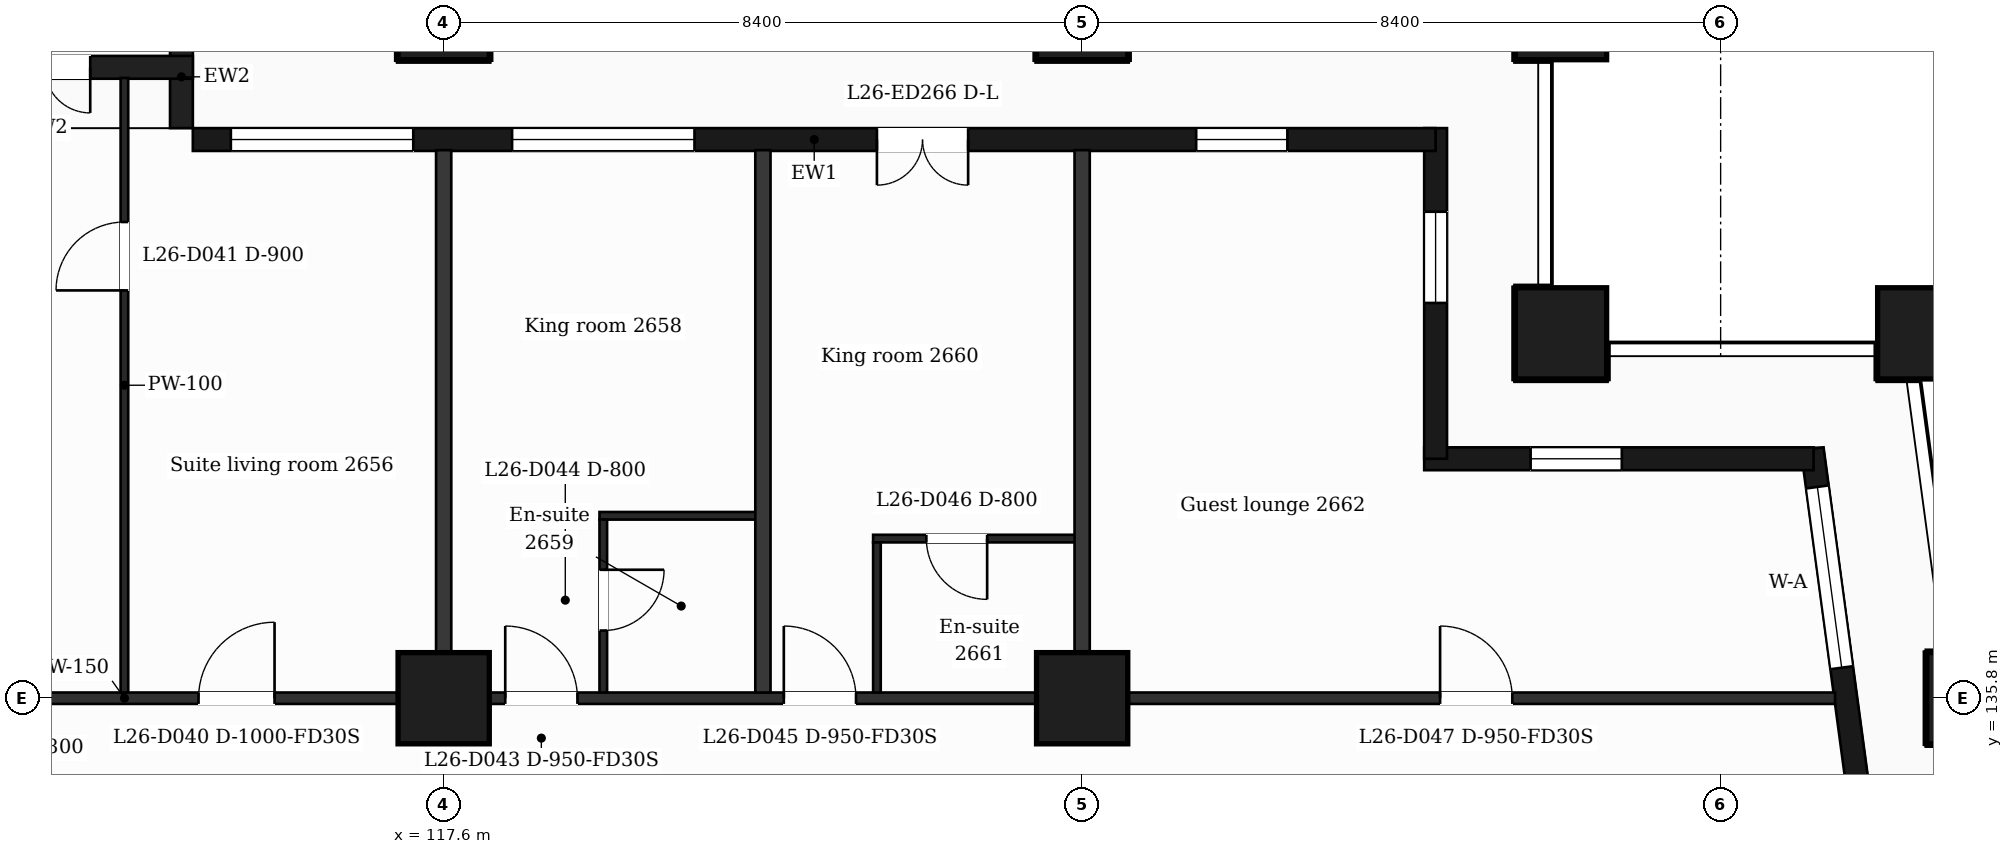
"""IFC4 building model, lengths in metres.
Left out: names, types, materials, properties, quantities, classifications, styles, units other than length and angle.
Written with IfcOpenShell. Run it as: python <this file> out.ifc"""

import sys

from ifc_helpers import new_model, si_unit, direction, frame, frame_2d, origin, origin_2d, place, context, subcontext, project, spatial, rectangle, extrude, element, fill, save


model = new_model("IFC4")
c1 = context("Model", 3, precision=1e-05, world=origin(), true_north=direction((0.0, 1.0)))
c2 = subcontext(c1, "Body", "Model", "MODEL_VIEW")
j1 = project(units=[si_unit("LENGTHUNIT", "METRE"), si_unit("PLANEANGLEUNIT", "RADIAN")], contexts=[c1])
p1 = place(None, origin())
s1 = spatial("IfcSite", under=j1, at=p1, CompositionType="ELEMENT")
p2 = place(p1, origin())
s2 = spatial("IfcBuilding", under=s1, at=p2, CompositionType="ELEMENT")
p3 = place(p2, frame((0.0, 0.0, 113.2)))
s3 = spatial("IfcBuildingStorey", under=s2, at=p3, CompositionType="ELEMENT", Elevation=113.2)
for number, where, z_axis, x_axis in (
    (1, (132.3, 140.6, 0.0), (0.0, 0.0, 1.0), (1.0, 0.0, 0.0)),
    (2, (137.065, 140.6, 0.0), (0.0, 0.0, 1.0), (1.0, 0.0, 0.0)),
    (3, (117.6, 135.8, 0.0), (0.0, 0.0, 1.0), (1.0, 0.0, 0.0)),
    (4, (126.0, 135.8, 0.0), (0.0, 0.0, 1.0), (1.0, 0.0, 0.0)),
    (5, (137.711, 135.8, 0.0), (0.0, 0.0, 1.0), (1.0, 0.0, 0.0)),
    (6, (117.6, 144.8, 0.0), (0.0, 0.0, 1.0), (1.0, 0.0, 0.0)),
    (7, (126.0, 144.8, 0.0), (0.0, 0.0, 1.0), (1.0, 0.0, 0.0)),
    (8, (132.3, 144.8, 0.0), (0.0, 0.0, 1.0), (1.0, 0.0, 0.0)),
):
    element("IfcColumn", number, at=place(p3, frame(where, z_axis=z_axis, x_axis=x_axis)), inside=s3, PredefinedType="COLUMN", context=c2, shape_type="SweptSolid", body=[
        extrude(rectangle(XDim=1.2, YDim=1.2, at=origin_2d()), origin(), (0.0, 0.0, 1.0), 3.7),
    ])
p4 = place(p3, frame((136.504, 132.4, 0.0), z_axis=(0.0, 0.0, 1.0), x_axis=(-0.133399697462, 0.99106231929, 0.0)))
e9 = element("IfcWall", 9, at=p4, inside=s3, PredefinedType="SOLIDWALL", context=c2, shape_type="SweptSolid", body=[
    extrude(rectangle(XDim=6.74, YDim=0.3, at=frame_2d((3.37, 0.0))), origin(), (0.0, 0.0, 1.0), 3.38),
])
p5 = place(p4, frame((1.115, 0.0, 0.0)))
e10 = element("IfcOpeningElement", 10, at=p5, cuts=e9, PredefinedType="OPENING", context=c2, shape_type="SweptSolid", body=[
    extrude(rectangle(XDim=1.2, YDim=2.4, at=frame_2d((0.6, 1.2))), frame((0.0, 0.16, 0.0), z_axis=(0.0, -1.0, 0.0), x_axis=(1.0, 0.0, 0.0)), (0.0, 0.0, 1.0), 0.32),
])
p6 = place(p4, frame((3.835, 0.0, 0.9)))
e11 = element("IfcOpeningElement", 11, at=p6, cuts=e9, PredefinedType="OPENING", context=c2, shape_type="SweptSolid", body=[
    extrude(rectangle(XDim=2.4, YDim=2.1, at=frame_2d((1.2, 1.05))), frame((0.0, 0.16, 0.0), z_axis=(0.0, -1.0, 0.0), x_axis=(1.0, 0.0, 0.0)), (0.0, 0.0, 1.0), 0.32),
])
p7 = place(p3, frame((135.623, 138.95, 0.0), z_axis=(0.0, 0.0, 1.0), x_axis=(-1.0, 0.0, 0.0)))
e12 = element("IfcWall", 12, at=p7, inside=s3, PredefinedType="SOLIDWALL", context=c2, shape_type="SweptSolid", body=[
    extrude(rectangle(XDim=5.123, YDim=0.3, at=frame_2d((2.561, 0.0))), origin(), (0.0, 0.0, 1.0), 3.38),
])
p8 = place(p7, frame((2.523, 0.0, 0.9)))
e13 = element("IfcOpeningElement", 13, at=p8, cuts=e12, PredefinedType="OPENING", context=c2, shape_type="SweptSolid", body=[
    extrude(rectangle(XDim=1.2, YDim=2.1, at=frame_2d((0.6, 1.05))), frame((0.0, 0.16, 0.0), z_axis=(0.0, -1.0, 0.0), x_axis=(1.0, 0.0, 0.0)), (0.0, 0.0, 1.0), 0.32),
])
p9 = place(p3, frame((130.65, 138.95, 0.0), z_axis=(0.0, 0.0, 1.0), x_axis=(0.0, 1.0, 0.0)))
e14 = element("IfcWall", 14, at=p9, inside=s3, PredefinedType="SOLIDWALL", context=c2, shape_type="SweptSolid", body=[
    extrude(rectangle(XDim=4.35, YDim=0.3, at=frame_2d((2.175, 0.0))), origin(), (0.0, 0.0, 1.0), 3.38),
])
p10 = place(p9, frame((2.05, 0.0, 0.9)))
e15 = element("IfcOpeningElement", 15, at=p10, cuts=e14, PredefinedType="OPENING", context=c2, shape_type="SweptSolid", body=[
    extrude(rectangle(XDim=1.2, YDim=2.1, at=frame_2d((0.6, 1.05))), frame((0.0, 0.16, 0.0), z_axis=(0.0, -1.0, 0.0), x_axis=(1.0, 0.0, 0.0)), (0.0, 0.0, 1.0), 0.32),
])
p11 = place(p3, frame((130.65, 143.15, 0.0), z_axis=(0.0, 0.0, 1.0), x_axis=(-1.0, 0.0, 0.0)))
e16 = element("IfcWall", 16, at=p11, inside=s3, PredefinedType="SOLIDWALL", context=c2, shape_type="SweptSolid", body=[
    extrude(rectangle(XDim=16.35, YDim=0.3, at=frame_2d((8.175, 0.0))), origin(), (0.0, 0.0, 1.0), 3.38),
])
p12 = place(p11, frame((1.95, 0.0, 0.9)))
e17 = element("IfcOpeningElement", 17, at=p12, cuts=e16, PredefinedType="OPENING", context=c2, shape_type="SweptSolid", body=[
    extrude(rectangle(XDim=1.2, YDim=2.1, at=frame_2d((0.6, 1.05))), frame((0.0, 0.16, 0.0), z_axis=(0.0, -1.0, 0.0), x_axis=(1.0, 0.0, 0.0)), (0.0, 0.0, 1.0), 0.32),
])
p13 = place(p11, frame((6.15, 0.0, 0.0)))
e18 = element("IfcOpeningElement", 18, at=p13, cuts=e16, PredefinedType="OPENING", context=c2, shape_type="SweptSolid", body=[
    extrude(rectangle(XDim=1.2, YDim=2.4, at=frame_2d((0.6, 1.2))), frame((0.0, 0.16, 0.0), z_axis=(0.0, -1.0, 0.0), x_axis=(1.0, 0.0, 0.0)), (0.0, 0.0, 1.0), 0.32),
])
p14 = place(p11, frame((9.75, 0.0, 0.9)))
e19 = element("IfcOpeningElement", 19, at=p14, cuts=e16, PredefinedType="OPENING", context=c2, shape_type="SweptSolid", body=[
    extrude(rectangle(XDim=2.4, YDim=2.1, at=frame_2d((1.2, 1.05))), frame((0.0, 0.16, 0.0), z_axis=(0.0, -1.0, 0.0), x_axis=(1.0, 0.0, 0.0)), (0.0, 0.0, 1.0), 0.32),
])
p15 = place(p11, frame((13.45, 0.0, 0.9)))
e20 = element("IfcOpeningElement", 20, at=p15, cuts=e16, PredefinedType="OPENING", context=c2, shape_type="SweptSolid", body=[
    extrude(rectangle(XDim=2.4, YDim=2.1, at=frame_2d((1.2, 1.05))), frame((0.0, 0.16, 0.0), z_axis=(0.0, -1.0, 0.0), x_axis=(1.0, 0.0, 0.0)), (0.0, 0.0, 1.0), 0.32),
])
p16 = place(p3, frame((114.15, 143.3, 0.0), z_axis=(0.0, 0.0, 1.0), x_axis=(0.0, 1.0, 0.0)))
e21 = element("IfcWall", 21, at=p16, inside=s3, PredefinedType="SOLIDWALL", context=c2, shape_type="SweptSolid", body=[
    extrude(rectangle(XDim=1.35, YDim=0.3, at=frame_2d((0.675, 0.0))), origin(), (0.0, 0.0, 1.0), 3.38),
])
p17 = place(p3, frame((114.3, 144.1, 0.0), z_axis=(0.0, 0.0, 1.0), x_axis=(-1.0, 0.0, 0.0)))
e22 = element("IfcWall", 22, at=p17, inside=s3, PredefinedType="SOLIDWALL", context=c2, shape_type="SweptSolid", body=[
    extrude(rectangle(XDim=3.9, YDim=0.3, at=frame_2d((1.95, 0.0))), origin(), (0.0, 0.0, 1.0), 3.38),
])
p18 = place(p17, frame((1.35, 0.0, 0.0)))
e23 = element("IfcOpeningElement", 23, at=p18, cuts=e22, PredefinedType="OPENING", context=c2, shape_type="SweptSolid", body=[
    extrude(rectangle(XDim=1.2, YDim=2.4, at=frame_2d((0.6, 1.2))), frame((0.0, 0.16, 0.0), z_axis=(0.0, -1.0, 0.0), x_axis=(1.0, 0.0, 0.0)), (0.0, 0.0, 1.0), 0.32),
])
p19 = place(p3, frame((90.895, 135.8, 0.0), z_axis=(0.0, 0.0, 1.0), x_axis=(1.0, 0.0, 0.0)))
e24 = element("IfcWall", 24, at=p19, inside=s3, PredefinedType="PARTITIONING", context=c2, shape_type="SweptSolid", body=[
    extrude(rectangle(XDim=45.011, YDim=0.15, at=frame_2d((22.505, 0.0))), origin(), (0.0, 0.0, 1.0), 3.38),
])
p20 = place(p19, frame((6.906, 0.0, 0.0)))
e25 = element("IfcOpeningElement", 25, at=p20, cuts=e24, PredefinedType="OPENING", context=c2, shape_type="SweptSolid", body=[
    extrude(rectangle(XDim=1.0, YDim=2.1, at=frame_2d((0.5, 1.05))), frame((0.0, 0.085, 0.0), z_axis=(0.0, -1.0, 0.0), x_axis=(1.0, 0.0, 0.0)), (0.0, 0.0, 1.0), 0.17),
])
p21 = place(p19, frame((12.13, 0.0, 0.0)))
e26 = element("IfcOpeningElement", 26, at=p21, cuts=e24, PredefinedType="OPENING", context=c2, shape_type="SweptSolid", body=[
    extrude(rectangle(XDim=1.0, YDim=2.1, at=frame_2d((0.5, 1.05))), frame((0.0, 0.085, 0.0), z_axis=(0.0, -1.0, 0.0), x_axis=(1.0, 0.0, 0.0)), (0.0, 0.0, 1.0), 0.17),
])
p22 = place(p19, frame((23.48, 0.0, 0.0)))
e27 = element("IfcOpeningElement", 27, at=p22, cuts=e24, PredefinedType="OPENING", context=c2, shape_type="SweptSolid", body=[
    extrude(rectangle(XDim=1.0, YDim=2.1, at=frame_2d((0.5, 1.05))), frame((0.0, 0.085, 0.0), z_axis=(0.0, -1.0, 0.0), x_axis=(1.0, 0.0, 0.0)), (0.0, 0.0, 1.0), 0.17),
])
p23 = place(p19, frame((27.515, 0.0, 0.0)))
e28 = element("IfcOpeningElement", 28, at=p23, cuts=e24, PredefinedType="OPENING", context=c2, shape_type="SweptSolid", body=[
    extrude(rectangle(XDim=0.95, YDim=2.1, at=frame_2d((0.475, 1.05))), frame((0.0, 0.085, 0.0), z_axis=(0.0, -1.0, 0.0), x_axis=(1.0, 0.0, 0.0)), (0.0, 0.0, 1.0), 0.17),
])
p24 = place(p19, frame((31.18, 0.0, 0.0)))
e29 = element("IfcOpeningElement", 29, at=p24, cuts=e24, PredefinedType="OPENING", context=c2, shape_type="SweptSolid", body=[
    extrude(rectangle(XDim=0.95, YDim=2.1, at=frame_2d((0.475, 1.05))), frame((0.0, 0.085, 0.0), z_axis=(0.0, -1.0, 0.0), x_axis=(1.0, 0.0, 0.0)), (0.0, 0.0, 1.0), 0.17),
])
p25 = place(p19, frame((39.814, 0.0, 0.0)))
e30 = element("IfcOpeningElement", 30, at=p25, cuts=e24, PredefinedType="OPENING", context=c2, shape_type="SweptSolid", body=[
    extrude(rectangle(XDim=0.95, YDim=2.1, at=frame_2d((0.475, 1.05))), frame((0.0, 0.085, 0.0), z_axis=(0.0, -1.0, 0.0), x_axis=(1.0, 0.0, 0.0)), (0.0, 0.0, 1.0), 0.17),
])
p26 = place(p3, frame((123.25, 137.9, 0.0), z_axis=(0.0, 0.0, 1.0), x_axis=(1.0, 0.0, 0.0)))
e31 = element("IfcWall", 31, at=p26, inside=s3, PredefinedType="PARTITIONING", context=c2, shape_type="SweptSolid", body=[
    extrude(rectangle(XDim=2.75, YDim=0.1, at=frame_2d((1.375, 0.0))), origin(), (0.0, 0.0, 1.0), 3.38),
])
p27 = place(p26, frame((0.7, 0.0, 0.0)))
e32 = element("IfcOpeningElement", 32, at=p27, cuts=e31, PredefinedType="OPENING", context=c2, shape_type="SweptSolid", body=[
    extrude(rectangle(XDim=0.8, YDim=2.1, at=frame_2d((0.4, 1.05))), frame((0.0, 0.06, 0.0), z_axis=(0.0, -1.0, 0.0), x_axis=(1.0, 0.0, 0.0)), (0.0, 0.0, 1.0), 0.12),
])
p28 = place(p3, frame((119.65, 138.2, 0.0), z_axis=(0.0, 0.0, 1.0), x_axis=(1.0, 0.0, 0.0)))
e33 = element("IfcWall", 33, at=p28, inside=s3, PredefinedType="PARTITIONING", context=c2, shape_type="SweptSolid", body=[
    extrude(rectangle(XDim=2.15, YDim=0.1, at=frame_2d((1.075, 0.0))), origin(), (0.0, 0.0, 1.0), 3.38),
])
p29 = place(p3, frame((113.4, 135.875, 0.0), z_axis=(0.0, 0.0, 1.0), x_axis=(0.0, 1.0, 0.0)))
e34 = element("IfcWall", 34, at=p29, inside=s3, PredefinedType="PARTITIONING", context=c2, shape_type="SweptSolid", body=[
    extrude(rectangle(XDim=8.085, YDim=0.1, at=frame_2d((4.042, 0.0))), origin(), (0.0, 0.0, 1.0), 3.38),
])
p30 = place(p29, frame((5.29, 0.0, 0.0)))
e35 = element("IfcOpeningElement", 35, at=p30, cuts=e34, PredefinedType="OPENING", context=c2, shape_type="SweptSolid", body=[
    extrude(rectangle(XDim=0.9, YDim=2.1, at=frame_2d((0.45, 1.05))), frame((0.0, 0.06, 0.0), z_axis=(0.0, -1.0, 0.0), x_axis=(1.0, 0.0, 0.0)), (0.0, 0.0, 1.0), 0.12),
])
p31 = place(p3, frame((117.6, 135.875, 0.0), z_axis=(0.0, 0.0, 1.0), x_axis=(0.0, 1.0, 0.0)))
e36 = element("IfcWall", 36, at=p31, inside=s3, PredefinedType="PARTITIONING", context=c2, shape_type="SweptSolid", body=[
    extrude(rectangle(XDim=7.135, YDim=0.2, at=frame_2d((3.567, 0.0))), origin(), (0.0, 0.0, 1.0), 3.38),
])
p32 = place(p3, frame((119.7, 135.875, 0.0), z_axis=(0.0, 0.0, 1.0), x_axis=(0.0, 1.0, 0.0)))
e37 = element("IfcWall", 37, at=p32, inside=s3, PredefinedType="PARTITIONING", context=c2, shape_type="SweptSolid", body=[
    extrude(rectangle(XDim=2.275, YDim=0.1, at=frame_2d((1.137, 0.0))), origin(), (0.0, 0.0, 1.0), 3.38),
])
p33 = place(p32, frame((0.815, 0.0, 0.0)))
e38 = element("IfcOpeningElement", 38, at=p33, cuts=e37, PredefinedType="OPENING", context=c2, shape_type="SweptSolid", body=[
    extrude(rectangle(XDim=0.8, YDim=2.1, at=frame_2d((0.4, 1.05))), frame((0.0, 0.06, 0.0), z_axis=(0.0, -1.0, 0.0), x_axis=(1.0, 0.0, 0.0)), (0.0, 0.0, 1.0), 0.12),
])
p34 = place(p3, frame((121.8, 135.875, 0.0), z_axis=(0.0, 0.0, 1.0), x_axis=(0.0, 1.0, 0.0)))
e39 = element("IfcWall", 39, at=p34, inside=s3, PredefinedType="PARTITIONING", context=c2, shape_type="SweptSolid", body=[
    extrude(rectangle(XDim=7.135, YDim=0.2, at=frame_2d((3.567, 0.0))), origin(), (0.0, 0.0, 1.0), 3.38),
])
p35 = place(p3, frame((123.3, 135.875, 0.0), z_axis=(0.0, 0.0, 1.0), x_axis=(0.0, 1.0, 0.0)))
e40 = element("IfcWall", 40, at=p35, inside=s3, PredefinedType="PARTITIONING", context=c2, shape_type="SweptSolid", body=[
    extrude(rectangle(XDim=1.975, YDim=0.1, at=frame_2d((0.988, 0.0))), origin(), (0.0, 0.0, 1.0), 3.38),
])
p36 = place(p3, frame((126.0, 135.875, 0.0), z_axis=(0.0, 0.0, 1.0), x_axis=(0.0, 1.0, 0.0)))
e41 = element("IfcWall", 41, at=p36, inside=s3, PredefinedType="PARTITIONING", context=c2, shape_type="SweptSolid", body=[
    extrude(rectangle(XDim=7.135, YDim=0.2, at=frame_2d((3.567, 0.0))), origin(), (0.0, 0.0, 1.0), 3.38),
])
p37 = place(p6, origin())
e42 = element("IfcWindow", 42, at=p37, inside=s3, PartitioningType="SINGLE_PANEL", PredefinedType="WINDOW", context=c2, shape_type="SweptSolid", body=[
    extrude(rectangle(XDim=2.4, YDim=2.1, at=frame_2d((1.2, 1.05))), frame((0.0, 0.03, 0.0), z_axis=(0.0, -1.0, 0.0), x_axis=(1.0, 0.0, 0.0)), (0.0, 0.0, 1.0), 0.06),
])
fill(e11, e42)
p38 = place(p8, origin())
e43 = element("IfcWindow", 43, at=p38, inside=s3, PartitioningType="SINGLE_PANEL", PredefinedType="WINDOW", context=c2, shape_type="SweptSolid", body=[
    extrude(rectangle(XDim=1.2, YDim=2.1, at=frame_2d((0.6, 1.05))), frame((0.0, 0.03, 0.0), z_axis=(0.0, -1.0, 0.0), x_axis=(1.0, 0.0, 0.0)), (0.0, 0.0, 1.0), 0.06),
])
fill(e13, e43)
p39 = place(p10, origin())
e44 = element("IfcWindow", 44, at=p39, inside=s3, PartitioningType="SINGLE_PANEL", PredefinedType="WINDOW", context=c2, shape_type="SweptSolid", body=[
    extrude(rectangle(XDim=1.2, YDim=2.1, at=frame_2d((0.6, 1.05))), frame((0.0, 0.03, 0.0), z_axis=(0.0, -1.0, 0.0), x_axis=(1.0, 0.0, 0.0)), (0.0, 0.0, 1.0), 0.06),
])
fill(e15, e44)
p40 = place(p12, origin())
e45 = element("IfcWindow", 45, at=p40, inside=s3, PartitioningType="SINGLE_PANEL", PredefinedType="WINDOW", context=c2, shape_type="SweptSolid", body=[
    extrude(rectangle(XDim=1.2, YDim=2.1, at=frame_2d((0.6, 1.05))), frame((0.0, 0.03, 0.0), z_axis=(0.0, -1.0, 0.0), x_axis=(1.0, 0.0, 0.0)), (0.0, 0.0, 1.0), 0.06),
])
fill(e17, e45)
p41 = place(p13, origin())
e46 = element("IfcDoor", 46, at=p41, inside=s3, OperationType="DOUBLE_DOOR_SINGLE_SWING", PredefinedType="DOOR", context=c2, shape_type="SweptSolid", body=[
    extrude(rectangle(XDim=1.2, YDim=2.4, at=frame_2d((0.6, 1.2))), frame((0.0, 0.025, 0.0), z_axis=(0.0, -1.0, 0.0), x_axis=(1.0, 0.0, 0.0)), (0.0, 0.0, 1.0), 0.05),
])
fill(e18, e46)
p42 = place(p14, origin())
e47 = element("IfcWindow", 47, at=p42, inside=s3, PartitioningType="SINGLE_PANEL", PredefinedType="WINDOW", context=c2, shape_type="SweptSolid", body=[
    extrude(rectangle(XDim=2.4, YDim=2.1, at=frame_2d((1.2, 1.05))), frame((0.0, 0.03, 0.0), z_axis=(0.0, -1.0, 0.0), x_axis=(1.0, 0.0, 0.0)), (0.0, 0.0, 1.0), 0.06),
])
fill(e19, e47)
p43 = place(p15, origin())
e48 = element("IfcWindow", 48, at=p43, inside=s3, PartitioningType="SINGLE_PANEL", PredefinedType="WINDOW", context=c2, shape_type="SweptSolid", body=[
    extrude(rectangle(XDim=2.4, YDim=2.1, at=frame_2d((1.2, 1.05))), frame((0.0, 0.03, 0.0), z_axis=(0.0, -1.0, 0.0), x_axis=(1.0, 0.0, 0.0)), (0.0, 0.0, 1.0), 0.06),
])
fill(e20, e48)
p44 = place(p18, origin())
e49 = element("IfcDoor", 49, at=p44, inside=s3, OperationType="DOUBLE_DOOR_SINGLE_SWING", PredefinedType="DOOR", context=c2, shape_type="SweptSolid", body=[
    extrude(rectangle(XDim=1.2, YDim=2.4, at=frame_2d((0.6, 1.2))), frame((0.0, 0.025, 0.0), z_axis=(0.0, -1.0, 0.0), x_axis=(1.0, 0.0, 0.0)), (0.0, 0.0, 1.0), 0.05),
])
fill(e23, e49)
p45 = place(p22, origin())
e50 = element("IfcDoor", 50, at=p45, inside=s3, OperationType="SINGLE_SWING_RIGHT", PredefinedType="DOOR", context=c2, shape_type="SweptSolid", body=[
    extrude(rectangle(XDim=1.0, YDim=2.1, at=frame_2d((0.5, 1.05))), frame((0.0, 0.025, 0.0), z_axis=(0.0, -1.0, 0.0), x_axis=(1.0, 0.0, 0.0)), (0.0, 0.0, 1.0), 0.05),
])
fill(e27, e50)
p46 = place(p30, origin())
e51 = element("IfcDoor", 51, at=p46, inside=s3, OperationType="SINGLE_SWING_LEFT", PredefinedType="DOOR", context=c2, shape_type="SweptSolid", body=[
    extrude(rectangle(XDim=0.9, YDim=2.1, at=frame_2d((0.45, 1.05))), frame((0.0, 0.025, 0.0), z_axis=(0.0, -1.0, 0.0), x_axis=(1.0, 0.0, 0.0)), (0.0, 0.0, 1.0), 0.05),
])
fill(e35, e51)
p47 = place(p23, origin())
e52 = element("IfcDoor", 52, at=p47, inside=s3, OperationType="SINGLE_SWING_LEFT", PredefinedType="DOOR", context=c2, shape_type="SweptSolid", body=[
    extrude(rectangle(XDim=0.95, YDim=2.1, at=frame_2d((0.475, 1.05))), frame((0.0, 0.025, 0.0), z_axis=(0.0, -1.0, 0.0), x_axis=(1.0, 0.0, 0.0)), (0.0, 0.0, 1.0), 0.05),
])
fill(e28, e52)
p48 = place(p33, origin())
e53 = element("IfcDoor", 53, at=p48, inside=s3, OperationType="SINGLE_SWING_RIGHT", PredefinedType="DOOR", context=c2, shape_type="SweptSolid", body=[
    extrude(rectangle(XDim=0.8, YDim=2.1, at=frame_2d((0.4, 1.05))), frame((0.0, 0.025, 0.0), z_axis=(0.0, -1.0, 0.0), x_axis=(1.0, 0.0, 0.0)), (0.0, 0.0, 1.0), 0.05),
])
fill(e38, e53)
p49 = place(p24, origin())
e54 = element("IfcDoor", 54, at=p49, inside=s3, OperationType="SINGLE_SWING_LEFT", PredefinedType="DOOR", context=c2, shape_type="SweptSolid", body=[
    extrude(rectangle(XDim=0.95, YDim=2.1, at=frame_2d((0.475, 1.05))), frame((0.0, 0.025, 0.0), z_axis=(0.0, -1.0, 0.0), x_axis=(1.0, 0.0, 0.0)), (0.0, 0.0, 1.0), 0.05),
])
fill(e29, e54)
p50 = place(p27, origin())
e55 = element("IfcDoor", 55, at=p50, inside=s3, OperationType="SINGLE_SWING_RIGHT", PredefinedType="DOOR", context=c2, shape_type="SweptSolid", body=[
    extrude(rectangle(XDim=0.8, YDim=2.1, at=frame_2d((0.4, 1.05))), frame((0.0, 0.025, 0.0), z_axis=(0.0, -1.0, 0.0), x_axis=(1.0, 0.0, 0.0)), (0.0, 0.0, 1.0), 0.05),
])
fill(e32, e55)
p51 = place(p25, origin())
e56 = element("IfcDoor", 56, at=p51, inside=s3, OperationType="SINGLE_SWING_LEFT", PredefinedType="DOOR", context=c2, shape_type="SweptSolid", body=[
    extrude(rectangle(XDim=0.95, YDim=2.1, at=frame_2d((0.475, 1.05))), frame((0.0, 0.025, 0.0), z_axis=(0.0, -1.0, 0.0), x_axis=(1.0, 0.0, 0.0)), (0.0, 0.0, 1.0), 0.05),
])
fill(e30, e56)
save(model, sys.argv[1])
